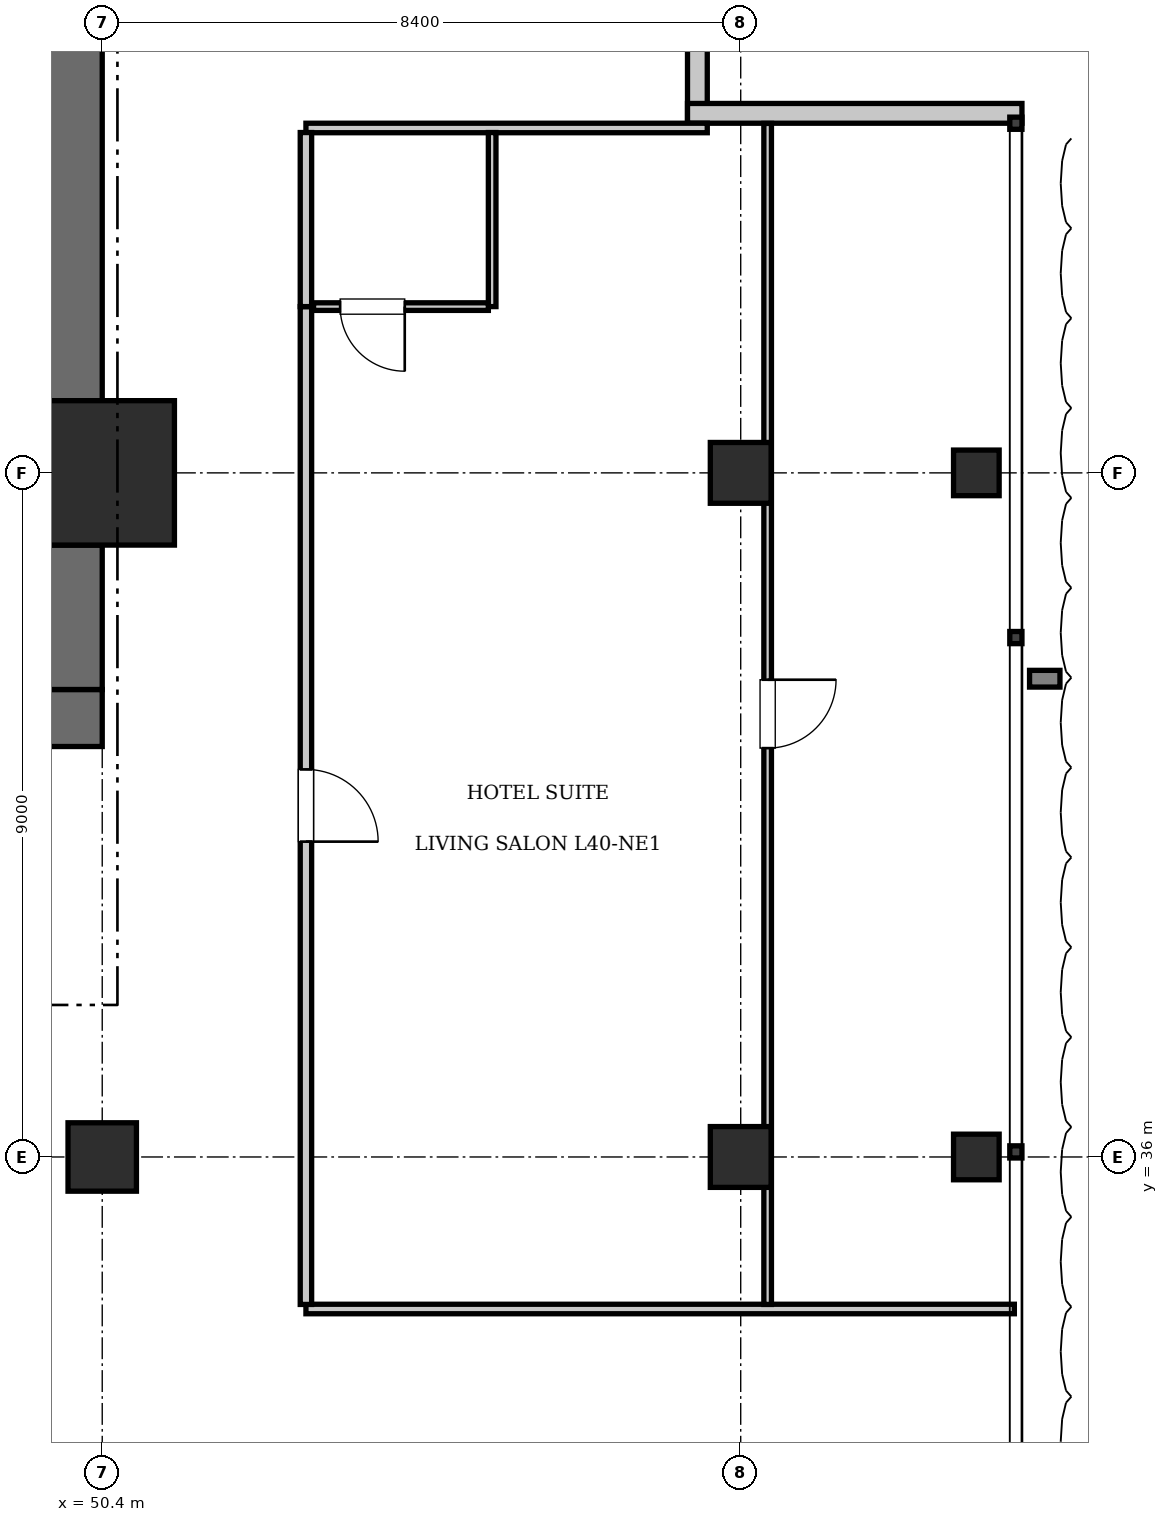
"""IFC4 building model, lengths in metres.
Left out: names, types, materials, properties, quantities, classifications, styles, units other than length and angle.
Written with IfcOpenShell. Run it as: python <this file> out.ifc"""

import sys

from ifc_helpers import new_model, si_unit, direction, frame, frame_2d, origin, origin_2d, place, context, subcontext, project, spatial, rectangle, i_section, extrude, element, fill, save


model = new_model("IFC4")
c1 = context("Model", 3, precision=1e-05, world=origin(), true_north=direction((0.0, 1.0)))
c2 = subcontext(c1, "Body", "Model", "MODEL_VIEW")
j1 = project(units=[si_unit("LENGTHUNIT", "METRE"), si_unit("PLANEANGLEUNIT", "RADIAN")], contexts=[c1])
p1 = place(None, origin())
s1 = spatial("IfcSite", under=j1, at=p1, CompositionType="ELEMENT")
p2 = place(p1, origin())
s2 = spatial("IfcBuilding", under=s1, at=p2, CompositionType="ELEMENT")
p3 = place(p2, frame((0.0, 0.0, 165.9)))
s3 = spatial("IfcBuildingStorey", under=s2, at=p3, CompositionType="ELEMENT", Elevation=165.9)
p4 = place(p3, frame((50.4, 45.0, 0.0), z_axis=(0.0, 0.0, 1.0), x_axis=(1.0, 0.0, 0.0)))
e1 = element("IfcColumn", 1, at=p4, inside=s3, PredefinedType="COLUMN", context=c2, shape_type="SweptSolid", body=[
    extrude(rectangle(XDim=1.9, YDim=1.9, at=origin_2d()), origin(), (0.0, 0.0, 1.0), 3.85),
])
p5 = place(p3, frame((43.6, 41.775, 0.0), z_axis=(0.0, 0.0, 1.0), x_axis=(1.0, 0.0, 0.0)))
e2 = element("IfcWall", 2, at=p5, inside=s3, PredefinedType="SHEAR", context=c2, shape_type="SweptSolid", body=[
    extrude(rectangle(XDim=6.8, YDim=0.75, at=frame_2d((3.4, 0.0))), origin(), (0.0, 0.0, 1.0), 3.85),
])
p6 = place(p5, frame((3.9, 0.0, 0.0)))
e3 = element("IfcOpeningElement", 3, at=p6, cuts=e2, PredefinedType="OPENING", context=c2, shape_type="SweptSolid", body=[
    extrude(rectangle(XDim=1.15, YDim=2.15, at=frame_2d((0.575, 1.075))), frame((0.0, 0.385, 0.0), z_axis=(0.0, -1.0, 0.0), x_axis=(1.0, 0.0, 0.0)), (0.0, 0.0, 1.0), 0.77),
])
p7 = place(p5, frame((0.55, 0.0, 0.0)))
e4 = element("IfcOpeningElement", 4, at=p7, cuts=e2, PredefinedType="OPENING", context=c2, shape_type="SweptSolid", body=[
    extrude(rectangle(XDim=1.1, YDim=2.2, at=frame_2d((0.55, 1.1))), frame((0.0, 0.385, 0.0), z_axis=(0.0, -1.0, 0.0), x_axis=(1.0, 0.0, 0.0)), (0.0, 0.0, 1.0), 0.77),
])
p8 = place(p3, frame((50.025, 42.15, 0.0), z_axis=(0.0, 0.0, 1.0), x_axis=(0.0, 1.0, 0.0)))
e5 = element("IfcWall", 5, at=p8, inside=s3, PredefinedType="SHEAR", context=c2, shape_type="SweptSolid", body=[
    extrude(rectangle(XDim=1.9, YDim=0.75, at=frame_2d((0.95, 0.0))), origin(), (0.0, 0.0, 1.0), 3.85),
])
p9 = place(p3, frame((50.025, 45.95, 0.0), z_axis=(0.0, 0.0, 1.0), x_axis=(0.0, 1.0, 0.0)))
e6 = element("IfcWall", 6, at=p9, inside=s3, PredefinedType="SHEAR", context=c2, shape_type="SweptSolid", body=[
    extrude(rectangle(XDim=7.3, YDim=0.75, at=frame_2d((3.65, 0.0))), origin(), (0.0, 0.0, 1.0), 3.85),
])
p10 = place(p3, frame((50.4, 36.0, 0.0), z_axis=(0.0, 0.0, 1.0), x_axis=(1.0, 0.0, 0.0)))
e7 = element("IfcColumn", 7, at=p10, inside=s3, PredefinedType="COLUMN", context=c2, shape_type="SweptSolid", body=[
    extrude(rectangle(XDim=0.9, YDim=0.9, at=origin_2d()), origin(), (0.0, 0.0, 1.0), 3.85),
])
for number, where, z_axis, x_axis in (
    (8, (58.8, 36.0, 0.0), (0.0, 0.0, 1.0), (1.0, 0.0, 0.0)),
    (9, (58.8, 45.0, 0.0), (0.0, 0.0, 1.0), (1.0, 0.0, 0.0)),
):
    element("IfcColumn", number, at=place(p3, frame(where, z_axis=z_axis, x_axis=x_axis)), inside=s3, PredefinedType="COLUMN", context=c2, shape_type="SweptSolid", body=[
        extrude(rectangle(XDim=0.8, YDim=0.8, at=origin_2d()), origin(), (0.0, 0.0, 1.0), 3.85),
    ])
for number, where, z_axis, x_axis in (
    (10, (61.9, 36.0, 0.0), (0.0, 0.0, 1.0), (1.0, 0.0, 0.0)),
    (11, (61.9, 45.0, 0.0), (0.0, 0.0, 1.0), (1.0, 0.0, 0.0)),
):
    element("IfcColumn", number, at=place(p3, frame(where, z_axis=z_axis, x_axis=x_axis)), inside=s3, PredefinedType="COLUMN", context=c2, shape_type="SweptSolid", body=[
        extrude(i_section(OverallWidth=0.6, OverallDepth=0.6, WebThickness=0.025, FlangeThickness=0.038, at=origin_2d()), origin(), (0.0, 0.0, 1.0), 3.85),
    ])
for number, where, z_axis, x_axis in (
    (12, (58.23, 54.0, 0.0), (0.0, 0.0, 1.0), (0.0, -1.0, 0.0)),
    (13, (58.1, 49.73, 0.0), (0.0, 0.0, 1.0), (1.0, 0.0, 0.0)),
):
    element("IfcWall", number, at=place(p3, frame(where, z_axis=z_axis, x_axis=x_axis)), inside=s3, PredefinedType="SOLIDWALL", context=c2, shape_type="SweptSolid", body=[
        extrude(rectangle(XDim=4.4, YDim=0.26, at=frame_2d((2.2, 0.0))), origin(), (0.0, 0.0, 1.0), 3.61),
    ])
p11 = place(p3, frame((53.08, 34.0, 0.0), z_axis=(0.0, 0.0, 1.0), x_axis=(1.0, 0.0, 0.0)))
e14 = element("IfcWall", 14, at=p11, inside=s3, PredefinedType="PARTITIONING", context=c2, shape_type="SweptSolid", body=[
    extrude(rectangle(XDim=9.32, YDim=0.125, at=frame_2d((4.66, 0.0))), origin(), (0.0, 0.0, 1.0), 3.61),
])
p12 = place(p3, frame((53.08, 49.538, 0.0), z_axis=(0.0, 0.0, 1.0), x_axis=(1.0, 0.0, 0.0)))
e15 = element("IfcWall", 15, at=p12, inside=s3, PredefinedType="PARTITIONING", context=c2, shape_type="SweptSolid", body=[
    extrude(rectangle(XDim=5.28, YDim=0.125, at=frame_2d((2.64, 0.0))), origin(), (0.0, 0.0, 1.0), 3.61),
])
p13 = place(p3, frame((53.08, 34.06, 0.0), z_axis=(0.0, 0.0, 1.0), x_axis=(0.0, 1.0, 0.0)))
e16 = element("IfcWall", 16, at=p13, inside=s3, PredefinedType="PARTITIONING", context=c2, shape_type="SweptSolid", body=[
    extrude(rectangle(XDim=13.127, YDim=0.15, at=frame_2d((6.564, 0.0))), origin(), (0.0, 0.0, 1.0), 3.61),
])
p14 = place(p13, frame((6.089, 0.0, 0.0)))
e17 = element("IfcOpeningElement", 17, at=p14, cuts=e16, PredefinedType="OPENING", context=c2, shape_type="SweptSolid", body=[
    extrude(rectangle(XDim=0.95, YDim=2.15, at=frame_2d((0.475, 1.075))), frame((0.0, 0.085, 0.0), z_axis=(0.0, -1.0, 0.0), x_axis=(1.0, 0.0, 0.0)), (0.0, 0.0, 1.0), 0.17),
])
p15 = place(p3, frame((53.08, 47.188, 0.0), z_axis=(0.0, 0.0, 1.0), x_axis=(0.0, 1.0, 0.0)))
e18 = element("IfcWall", 18, at=p15, inside=s3, PredefinedType="PARTITIONING", context=c2, shape_type="SweptSolid", body=[
    extrude(rectangle(XDim=2.29, YDim=0.15, at=frame_2d((1.145, 0.0))), origin(), (0.0, 0.0, 1.0), 3.61),
])
p16 = place(p3, frame((55.53, 47.188, 0.0), z_axis=(0.0, 0.0, 1.0), x_axis=(0.0, 1.0, 0.0)))
e19 = element("IfcWall", 19, at=p16, inside=s3, PredefinedType="PARTITIONING", context=c2, shape_type="SweptSolid", body=[
    extrude(rectangle(XDim=2.29, YDim=0.1, at=frame_2d((1.145, 0.0))), origin(), (0.0, 0.0, 1.0), 3.61),
])
p17 = place(p3, frame((53.18, 47.188, 0.0), z_axis=(0.0, 0.0, 1.0), x_axis=(1.0, 0.0, 0.0)))
e20 = element("IfcWall", 20, at=p17, inside=s3, PredefinedType="PARTITIONING", context=c2, shape_type="SweptSolid", body=[
    extrude(rectangle(XDim=2.3, YDim=0.1, at=frame_2d((1.15, 0.0))), origin(), (0.0, 0.0, 1.0), 3.61),
])
p18 = place(p17, frame((0.35, 0.0, 0.0)))
e21 = element("IfcOpeningElement", 21, at=p18, cuts=e20, PredefinedType="OPENING", context=c2, shape_type="SweptSolid", body=[
    extrude(rectangle(XDim=0.85, YDim=2.1, at=frame_2d((0.425, 1.05))), frame((0.0, 0.06, 0.0), z_axis=(0.0, -1.0, 0.0), x_axis=(1.0, 0.0, 0.0)), (0.0, 0.0, 1.0), 0.12),
])
p19 = place(p3, frame((59.154, 34.06, 0.0), z_axis=(0.0, 0.0, 1.0), x_axis=(0.0, 1.0, 0.0)))
e22 = element("IfcWall", 22, at=p19, inside=s3, PredefinedType="PARTITIONING", context=c2, shape_type="SweptSolid", body=[
    extrude(rectangle(XDim=15.537, YDim=0.1, at=frame_2d((7.769, 0.0))), origin(), (0.0, 0.0, 1.0), 3.61),
])
p20 = place(p19, frame((7.319, 0.0, 0.0)))
e23 = element("IfcOpeningElement", 23, at=p20, cuts=e22, PredefinedType="OPENING", context=c2, shape_type="SweptSolid", body=[
    extrude(rectangle(XDim=0.9, YDim=2.1, at=frame_2d((0.45, 1.05))), frame((0.0, 0.06, 0.0), z_axis=(0.0, -1.0, 0.0), x_axis=(1.0, 0.0, 0.0)), (0.0, 0.0, 1.0), 0.12),
])
p21 = place(p18, frame((0.85, 0.0, 0.0), z_axis=(0.0, 0.0, 1.0), x_axis=(-1.0, 0.0, 0.0)))
e24 = element("IfcDoor", 24, at=p21, inside=s3, OperationType="SINGLE_SWING_LEFT", PredefinedType="DOOR", context=c2, shape_type="SweptSolid", body=[
    extrude(rectangle(XDim=0.85, YDim=2.1, at=frame_2d((0.425, 1.05))), frame((0.0, 0.025, 0.0), z_axis=(0.0, -1.0, 0.0), x_axis=(1.0, 0.0, 0.0)), (0.0, 0.0, 1.0), 0.05),
])
fill(e21, e24)
p22 = place(p14, frame((0.95, 0.0, 0.0), z_axis=(0.0, 0.0, 1.0), x_axis=(-1.0, 0.0, 0.0)))
e25 = element("IfcDoor", 25, at=p22, inside=s3, OperationType="SINGLE_SWING_RIGHT", PredefinedType="DOOR", context=c2, shape_type="SweptSolid", body=[
    extrude(rectangle(XDim=0.95, YDim=2.15, at=frame_2d((0.475, 1.075))), frame((0.0, 0.025, 0.0), z_axis=(0.0, -1.0, 0.0), x_axis=(1.0, 0.0, 0.0)), (0.0, 0.0, 1.0), 0.05),
])
fill(e17, e25)
p23 = place(p20, frame((0.9, 0.0, 0.0), z_axis=(0.0, 0.0, 1.0), x_axis=(-1.0, 0.0, 0.0)))
e26 = element("IfcDoor", 26, at=p23, inside=s3, OperationType="SINGLE_SWING_LEFT", PredefinedType="DOOR", context=c2, shape_type="SweptSolid", body=[
    extrude(rectangle(XDim=0.9, YDim=2.1, at=frame_2d((0.45, 1.05))), frame((0.0, 0.025, 0.0), z_axis=(0.0, -1.0, 0.0), x_axis=(1.0, 0.0, 0.0)), (0.0, 0.0, 1.0), 0.05),
])
fill(e23, e26)
save(model, sys.argv[1])
